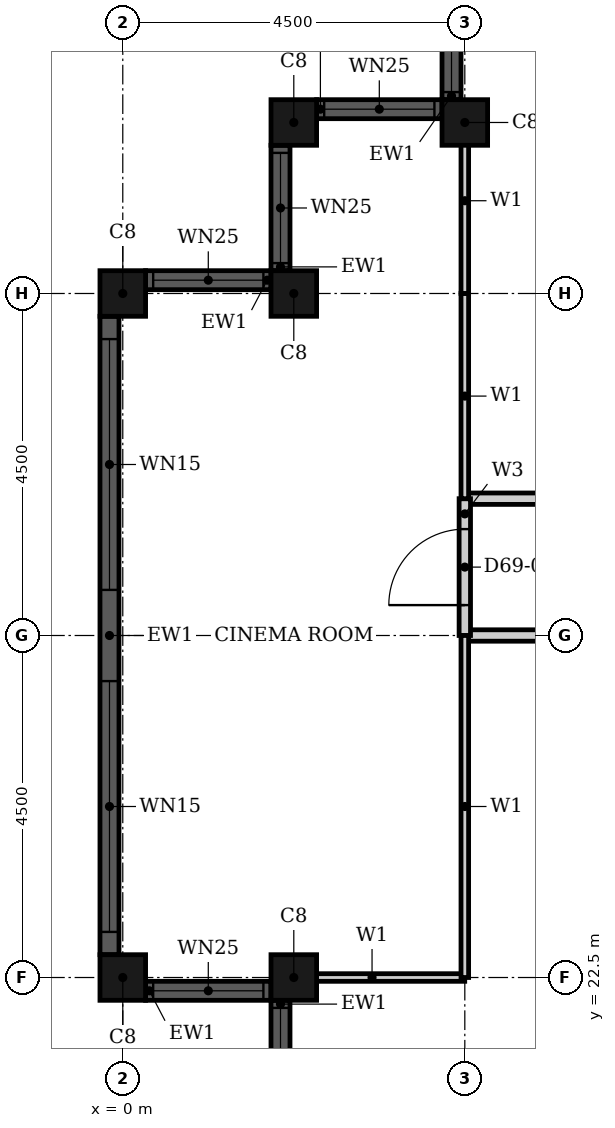
"""IFC4 building model, lengths in metres.
Left out: names, types, materials, properties, quantities, classifications, styles, units other than length and angle.
Written with IfcOpenShell. Run it as: python <this file> out.ifc"""

import sys

from ifc_helpers import new_model, si_unit, direction, frame, frame_2d, origin, origin_2d, place, context, subcontext, project, spatial, rectangle, hollow_rectangle, extrude, element, fill, save


model = new_model("IFC4")
c1 = context("Model", 3, precision=1e-05, world=origin(), true_north=direction((0.0, 1.0)))
c2 = subcontext(c1, "Body", "Model", "MODEL_VIEW")
j1 = project(units=[si_unit("LENGTHUNIT", "METRE"), si_unit("PLANEANGLEUNIT", "RADIAN")], contexts=[c1])
p1 = place(None, origin())
s1 = spatial("IfcSite", under=j1, at=p1, CompositionType="ELEMENT")
p2 = place(p1, origin())
s2 = spatial("IfcBuilding", under=s1, at=p2, CompositionType="ELEMENT")
p3 = place(p2, frame((0.0, 0.0, 271.2)))
s3 = spatial("IfcBuildingStorey", under=s2, at=p3, CompositionType="ELEMENT", Elevation=271.2)
for number, where, z_axis, x_axis in (
    (1, (4.5, 33.75, 0.0), (0.0, 0.0, 1.0), (1.0, 0.0, 0.0)),
    (2, (2.25, 33.75, 0.0), (0.0, 0.0, 1.0), (1.0, 0.0, 0.0)),
    (3, (2.25, 31.5, 0.0), (0.0, 0.0, 1.0), (1.0, 0.0, 0.0)),
    (4, (0.0, 31.5, 0.0), (0.0, 0.0, 1.0), (1.0, 0.0, 0.0)),
    (5, (0.0, 22.5, 0.0), (0.0, 0.0, 1.0), (1.0, 0.0, 0.0)),
    (6, (2.25, 22.5, 0.0), (0.0, 0.0, 1.0), (1.0, 0.0, 0.0)),
):
    element("IfcColumn", number, at=place(p3, frame(where, z_axis=z_axis, x_axis=x_axis)), inside=s3, PredefinedType="COLUMN", context=c2, shape_type="SweptSolid", body=[
        extrude(hollow_rectangle(XDim=0.6, YDim=0.6, WallThickness=0.02, at=origin_2d()), origin(), (0.0, 0.0, 1.0), 3.7),
    ])
p4 = place(p3, frame((4.325, 35.7, 0.0), z_axis=(0.0, 0.0, 1.0), x_axis=(0.0, -1.0, 0.0)))
e7 = element("IfcWall", 7, at=p4, inside=s3, PredefinedType="SOLIDWALL", context=c2, shape_type="SweptSolid", body=[
    extrude(rectangle(XDim=1.65, YDim=0.25, at=frame_2d((0.825, 0.0))), origin(), (0.0, 0.0, 1.0), 3.7),
])
p5 = place(p4, frame((0.1, 0.0, 0.9)))
e8 = element("IfcOpeningElement", 8, at=p5, cuts=e7, PredefinedType="OPENING", context=c2, shape_type="SweptSolid", body=[
    extrude(rectangle(XDim=1.45, YDim=1.85, at=frame_2d((0.725, 0.925))), frame((0.0, 0.135, 0.0), z_axis=(0.0, -1.0, 0.0), x_axis=(1.0, 0.0, 0.0)), (0.0, 0.0, 1.0), 0.27),
])
p6 = place(p3, frame((4.2, 33.925, 0.0), z_axis=(0.0, 0.0, 1.0), x_axis=(-1.0, 0.0, 0.0)))
e9 = element("IfcWall", 9, at=p6, inside=s3, PredefinedType="SOLIDWALL", context=c2, shape_type="SweptSolid", body=[
    extrude(rectangle(XDim=1.65, YDim=0.25, at=frame_2d((0.825, 0.0))), origin(), (0.0, 0.0, 1.0), 3.7),
])
p7 = place(p6, frame((0.1, 0.0, 0.9)))
e10 = element("IfcOpeningElement", 10, at=p7, cuts=e9, PredefinedType="OPENING", context=c2, shape_type="SweptSolid", body=[
    extrude(rectangle(XDim=1.45, YDim=1.85, at=frame_2d((0.725, 0.925))), frame((0.0, 0.135, 0.0), z_axis=(0.0, -1.0, 0.0), x_axis=(1.0, 0.0, 0.0)), (0.0, 0.0, 1.0), 0.27),
])
p8 = place(p3, frame((2.075, 33.45, 0.0), z_axis=(0.0, 0.0, 1.0), x_axis=(0.0, -1.0, 0.0)))
e11 = element("IfcWall", 11, at=p8, inside=s3, PredefinedType="SOLIDWALL", context=c2, shape_type="SweptSolid", body=[
    extrude(rectangle(XDim=1.65, YDim=0.25, at=frame_2d((0.825, 0.0))), origin(), (0.0, 0.0, 1.0), 3.7),
])
p9 = place(p8, frame((0.1, 0.0, 0.9)))
e12 = element("IfcOpeningElement", 12, at=p9, cuts=e11, PredefinedType="OPENING", context=c2, shape_type="SweptSolid", body=[
    extrude(rectangle(XDim=1.45, YDim=1.85, at=frame_2d((0.725, 0.925))), frame((0.0, 0.135, 0.0), z_axis=(0.0, -1.0, 0.0), x_axis=(1.0, 0.0, 0.0)), (0.0, 0.0, 1.0), 0.27),
])
p10 = place(p3, frame((1.95, 31.675, 0.0), z_axis=(0.0, 0.0, 1.0), x_axis=(-1.0, 0.0, 0.0)))
e13 = element("IfcWall", 13, at=p10, inside=s3, PredefinedType="SOLIDWALL", context=c2, shape_type="SweptSolid", body=[
    extrude(rectangle(XDim=1.65, YDim=0.25, at=frame_2d((0.825, 0.0))), origin(), (0.0, 0.0, 1.0), 3.7),
])
p11 = place(p10, frame((0.1, 0.0, 0.9)))
e14 = element("IfcOpeningElement", 14, at=p11, cuts=e13, PredefinedType="OPENING", context=c2, shape_type="SweptSolid", body=[
    extrude(rectangle(XDim=1.45, YDim=1.85, at=frame_2d((0.725, 0.925))), frame((0.0, 0.135, 0.0), z_axis=(0.0, -1.0, 0.0), x_axis=(1.0, 0.0, 0.0)), (0.0, 0.0, 1.0), 0.27),
])
p12 = place(p3, frame((-0.175, 31.2, 0.0), z_axis=(0.0, 0.0, 1.0), x_axis=(0.0, -1.0, 0.0)))
e15 = element("IfcWall", 15, at=p12, inside=s3, PredefinedType="SOLIDWALL", context=c2, shape_type="SweptSolid", body=[
    extrude(rectangle(XDim=8.4, YDim=0.25, at=frame_2d((4.2, 0.0))), origin(), (0.0, 0.0, 1.0), 3.7),
])
p13 = place(p12, frame((0.3, 0.0, 0.45)))
e16 = element("IfcOpeningElement", 16, at=p13, cuts=e15, PredefinedType="OPENING", context=c2, shape_type="SweptSolid", body=[
    extrude(rectangle(XDim=3.3, YDim=2.3, at=frame_2d((1.65, 1.15))), frame((0.0, 0.135, 0.0), z_axis=(0.0, -1.0, 0.0), x_axis=(1.0, 0.0, 0.0)), (0.0, 0.0, 1.0), 0.27),
])
p14 = place(p12, frame((4.8, 0.0, 0.45)))
e17 = element("IfcOpeningElement", 17, at=p14, cuts=e15, PredefinedType="OPENING", context=c2, shape_type="SweptSolid", body=[
    extrude(rectangle(XDim=3.3, YDim=2.3, at=frame_2d((1.65, 1.15))), frame((0.0, 0.135, 0.0), z_axis=(0.0, -1.0, 0.0), x_axis=(1.0, 0.0, 0.0)), (0.0, 0.0, 1.0), 0.27),
])
p15 = place(p3, frame((0.3, 22.325, 0.0), z_axis=(0.0, 0.0, 1.0), x_axis=(1.0, 0.0, 0.0)))
e18 = element("IfcWall", 18, at=p15, inside=s3, PredefinedType="SOLIDWALL", context=c2, shape_type="SweptSolid", body=[
    extrude(rectangle(XDim=1.65, YDim=0.25, at=frame_2d((0.825, 0.0))), origin(), (0.0, 0.0, 1.0), 3.7),
])
p16 = place(p15, frame((0.1, 0.0, 0.9)))
e19 = element("IfcOpeningElement", 19, at=p16, cuts=e18, PredefinedType="OPENING", context=c2, shape_type="SweptSolid", body=[
    extrude(rectangle(XDim=1.45, YDim=1.85, at=frame_2d((0.725, 0.925))), frame((0.0, 0.135, 0.0), z_axis=(0.0, -1.0, 0.0), x_axis=(1.0, 0.0, 0.0)), (0.0, 0.0, 1.0), 0.27),
])
p17 = place(p3, frame((2.075, 22.2, 0.0), z_axis=(0.0, 0.0, 1.0), x_axis=(0.0, -1.0, 0.0)))
e20 = element("IfcWall", 20, at=p17, inside=s3, PredefinedType="SOLIDWALL", context=c2, shape_type="SweptSolid", body=[
    extrude(rectangle(XDim=1.65, YDim=0.25, at=frame_2d((0.825, 0.0))), origin(), (0.0, 0.0, 1.0), 3.7),
])
p18 = place(p17, frame((0.1, 0.0, 0.9)))
e21 = element("IfcOpeningElement", 21, at=p18, cuts=e20, PredefinedType="OPENING", context=c2, shape_type="SweptSolid", body=[
    extrude(rectangle(XDim=1.45, YDim=1.85, at=frame_2d((0.725, 0.925))), frame((0.0, 0.135, 0.0), z_axis=(0.0, -1.0, 0.0), x_axis=(1.0, 0.0, 0.0)), (0.0, 0.0, 1.0), 0.27),
])
p19 = place(p3, frame((4.5, 27.0, 0.0), z_axis=(0.0, 0.0, 1.0), x_axis=(1.0, 0.0, 0.0)))
e22 = element("IfcWall", 22, at=p19, inside=s3, PredefinedType="PARTITIONING", context=c2, shape_type="SweptSolid", body=[
    extrude(rectangle(XDim=13.5, YDim=0.15, at=frame_2d((6.75, 0.0))), origin(), (0.0, 0.0, 1.0), 2.68),
])
p20 = place(p19, frame((5.35, 0.0, 0.0)))
e23 = element("IfcOpeningElement", 23, at=p20, cuts=e22, PredefinedType="OPENING", context=c2, shape_type="SweptSolid", body=[
    extrude(rectangle(XDim=1.0, YDim=2.1, at=frame_2d((0.5, 1.05))), frame((0.0, 0.085, 0.0), z_axis=(0.0, -1.0, 0.0), x_axis=(1.0, 0.0, 0.0)), (0.0, 0.0, 1.0), 0.17),
])
p21 = place(p3, frame((4.5, 28.8, 0.0), z_axis=(0.0, 0.0, 1.0), x_axis=(1.0, 0.0, 0.0)))
e24 = element("IfcWall", 24, at=p21, inside=s3, PredefinedType="PARTITIONING", context=c2, shape_type="SweptSolid", body=[
    extrude(rectangle(XDim=11.699, YDim=0.15, at=frame_2d((5.85, 0.0))), origin(), (0.0, 0.0, 1.0), 3.4),
])
p22 = place(p21, frame((4.0, 0.0, 0.0)))
e25 = element("IfcOpeningElement", 25, at=p22, cuts=e24, PredefinedType="OPENING", context=c2, shape_type="SweptSolid", body=[
    extrude(rectangle(XDim=1.0, YDim=2.1, at=frame_2d((0.5, 1.05))), frame((0.0, 0.085, 0.0), z_axis=(0.0, -1.0, 0.0), x_axis=(1.0, 0.0, 0.0)), (0.0, 0.0, 1.0), 0.17),
])
p23 = place(p3, frame((4.5, 27.0, 0.0), z_axis=(0.0, 0.0, 1.0), x_axis=(0.0, 1.0, 0.0)))
e26 = element("IfcWall", 26, at=p23, inside=s3, PredefinedType="PARTITIONING", context=c2, shape_type="SweptSolid", body=[
    extrude(rectangle(XDim=1.8, YDim=0.15, at=frame_2d((0.9, 0.0))), origin(), (0.0, 0.0, 1.0), 3.4),
])
p24 = place(p23, frame((0.4, 0.0, 0.0)))
e27 = element("IfcOpeningElement", 27, at=p24, cuts=e26, PredefinedType="OPENING", context=c2, shape_type="SweptSolid", body=[
    extrude(rectangle(XDim=1.0, YDim=2.1, at=frame_2d((0.5, 1.05))), frame((0.0, 0.085, 0.0), z_axis=(0.0, -1.0, 0.0), x_axis=(1.0, 0.0, 0.0)), (0.0, 0.0, 1.0), 0.17),
])
p25 = place(p3, frame((2.06, 22.5, 0.0), z_axis=(0.0, 0.0, 1.0), x_axis=(1.0, 0.0, 0.0)))
e28 = element("IfcWall", 28, at=p25, inside=s3, PredefinedType="PARTITIONING", context=c2, shape_type="SweptSolid", body=[
    extrude(rectangle(XDim=2.439, YDim=0.1, at=frame_2d((1.219, 0.0))), origin(), (0.0, 0.0, 1.0), 2.68),
])
p26 = place(p3, frame((4.5, 28.8, 0.0), z_axis=(0.0, 0.0, 1.0), x_axis=(0.0, 1.0, 0.0)))
e29 = element("IfcWall", 29, at=p26, inside=s3, PredefinedType="PARTITIONING", context=c2, shape_type="SweptSolid", body=[
    extrude(rectangle(XDim=2.7, YDim=0.1, at=frame_2d((1.35, 0.0))), origin(), (0.0, 0.0, 1.0), 3.4),
])
p27 = place(p3, frame((4.5, 31.501, 0.0), z_axis=(0.0, 0.0, 1.0), x_axis=(0.0, 1.0, 0.0)))
e30 = element("IfcWall", 30, at=p27, inside=s3, PredefinedType="PARTITIONING", context=c2, shape_type="SweptSolid", body=[
    extrude(rectangle(XDim=2.439, YDim=0.1, at=frame_2d((1.219, 0.0))), origin(), (0.0, 0.0, 1.0), 3.4),
])
p28 = place(p3, frame((4.5, 22.5, 0.0), z_axis=(0.0, 0.0, 1.0), x_axis=(0.0, 1.0, 0.0)))
e31 = element("IfcWall", 31, at=p28, inside=s3, PredefinedType="PARTITIONING", context=c2, shape_type="SweptSolid", body=[
    extrude(rectangle(XDim=4.5, YDim=0.1, at=frame_2d((2.25, 0.0))), origin(), (0.0, 0.0, 1.0), 3.4),
])
p29 = place(p5, origin())
e32 = element("IfcWindow", 32, at=p29, inside=s3, PartitioningType="SINGLE_PANEL", PredefinedType="WINDOW", context=c2, shape_type="SweptSolid", body=[
    extrude(rectangle(XDim=1.45, YDim=1.85, at=frame_2d((0.725, 0.925))), frame((0.0, 0.03, 0.0), z_axis=(0.0, -1.0, 0.0), x_axis=(1.0, 0.0, 0.0)), (0.0, 0.0, 1.0), 0.06),
])
fill(e8, e32)
p30 = place(p7, origin())
e33 = element("IfcWindow", 33, at=p30, inside=s3, PartitioningType="SINGLE_PANEL", PredefinedType="WINDOW", context=c2, shape_type="SweptSolid", body=[
    extrude(rectangle(XDim=1.45, YDim=1.85, at=frame_2d((0.725, 0.925))), frame((0.0, 0.03, 0.0), z_axis=(0.0, -1.0, 0.0), x_axis=(1.0, 0.0, 0.0)), (0.0, 0.0, 1.0), 0.06),
])
fill(e10, e33)
p31 = place(p9, origin())
e34 = element("IfcWindow", 34, at=p31, inside=s3, PartitioningType="SINGLE_PANEL", PredefinedType="WINDOW", context=c2, shape_type="SweptSolid", body=[
    extrude(rectangle(XDim=1.45, YDim=1.85, at=frame_2d((0.725, 0.925))), frame((0.0, 0.03, 0.0), z_axis=(0.0, -1.0, 0.0), x_axis=(1.0, 0.0, 0.0)), (0.0, 0.0, 1.0), 0.06),
])
fill(e12, e34)
p32 = place(p11, origin())
e35 = element("IfcWindow", 35, at=p32, inside=s3, PartitioningType="SINGLE_PANEL", PredefinedType="WINDOW", context=c2, shape_type="SweptSolid", body=[
    extrude(rectangle(XDim=1.45, YDim=1.85, at=frame_2d((0.725, 0.925))), frame((0.0, 0.03, 0.0), z_axis=(0.0, -1.0, 0.0), x_axis=(1.0, 0.0, 0.0)), (0.0, 0.0, 1.0), 0.06),
])
fill(e14, e35)
p33 = place(p13, origin())
e36 = element("IfcWindow", 36, at=p33, inside=s3, PartitioningType="SINGLE_PANEL", PredefinedType="WINDOW", context=c2, shape_type="SweptSolid", body=[
    extrude(rectangle(XDim=3.3, YDim=2.3, at=frame_2d((1.65, 1.15))), frame((0.0, 0.03, 0.0), z_axis=(0.0, -1.0, 0.0), x_axis=(1.0, 0.0, 0.0)), (0.0, 0.0, 1.0), 0.06),
])
fill(e16, e36)
p34 = place(p14, origin())
e37 = element("IfcWindow", 37, at=p34, inside=s3, PartitioningType="SINGLE_PANEL", PredefinedType="WINDOW", context=c2, shape_type="SweptSolid", body=[
    extrude(rectangle(XDim=3.3, YDim=2.3, at=frame_2d((1.65, 1.15))), frame((0.0, 0.03, 0.0), z_axis=(0.0, -1.0, 0.0), x_axis=(1.0, 0.0, 0.0)), (0.0, 0.0, 1.0), 0.06),
])
fill(e17, e37)
p35 = place(p16, origin())
e38 = element("IfcWindow", 38, at=p35, inside=s3, PartitioningType="SINGLE_PANEL", PredefinedType="WINDOW", context=c2, shape_type="SweptSolid", body=[
    extrude(rectangle(XDim=1.45, YDim=1.85, at=frame_2d((0.725, 0.925))), frame((0.0, 0.03, 0.0), z_axis=(0.0, -1.0, 0.0), x_axis=(1.0, 0.0, 0.0)), (0.0, 0.0, 1.0), 0.06),
])
fill(e19, e38)
p36 = place(p18, origin())
e39 = element("IfcWindow", 39, at=p36, inside=s3, PartitioningType="SINGLE_PANEL", PredefinedType="WINDOW", context=c2, shape_type="SweptSolid", body=[
    extrude(rectangle(XDim=1.45, YDim=1.85, at=frame_2d((0.725, 0.925))), frame((0.0, 0.03, 0.0), z_axis=(0.0, -1.0, 0.0), x_axis=(1.0, 0.0, 0.0)), (0.0, 0.0, 1.0), 0.06),
])
fill(e21, e39)
p37 = place(p24, origin())
e40 = element("IfcDoor", 40, at=p37, inside=s3, OperationType="SINGLE_SWING_LEFT", PredefinedType="DOOR", context=c2, shape_type="SweptSolid", body=[
    extrude(rectangle(XDim=1.0, YDim=2.1, at=frame_2d((0.5, 1.05))), frame((0.0, 0.025, 0.0), z_axis=(0.0, -1.0, 0.0), x_axis=(1.0, 0.0, 0.0)), (0.0, 0.0, 1.0), 0.05),
])
fill(e27, e40)
save(model, sys.argv[1])
